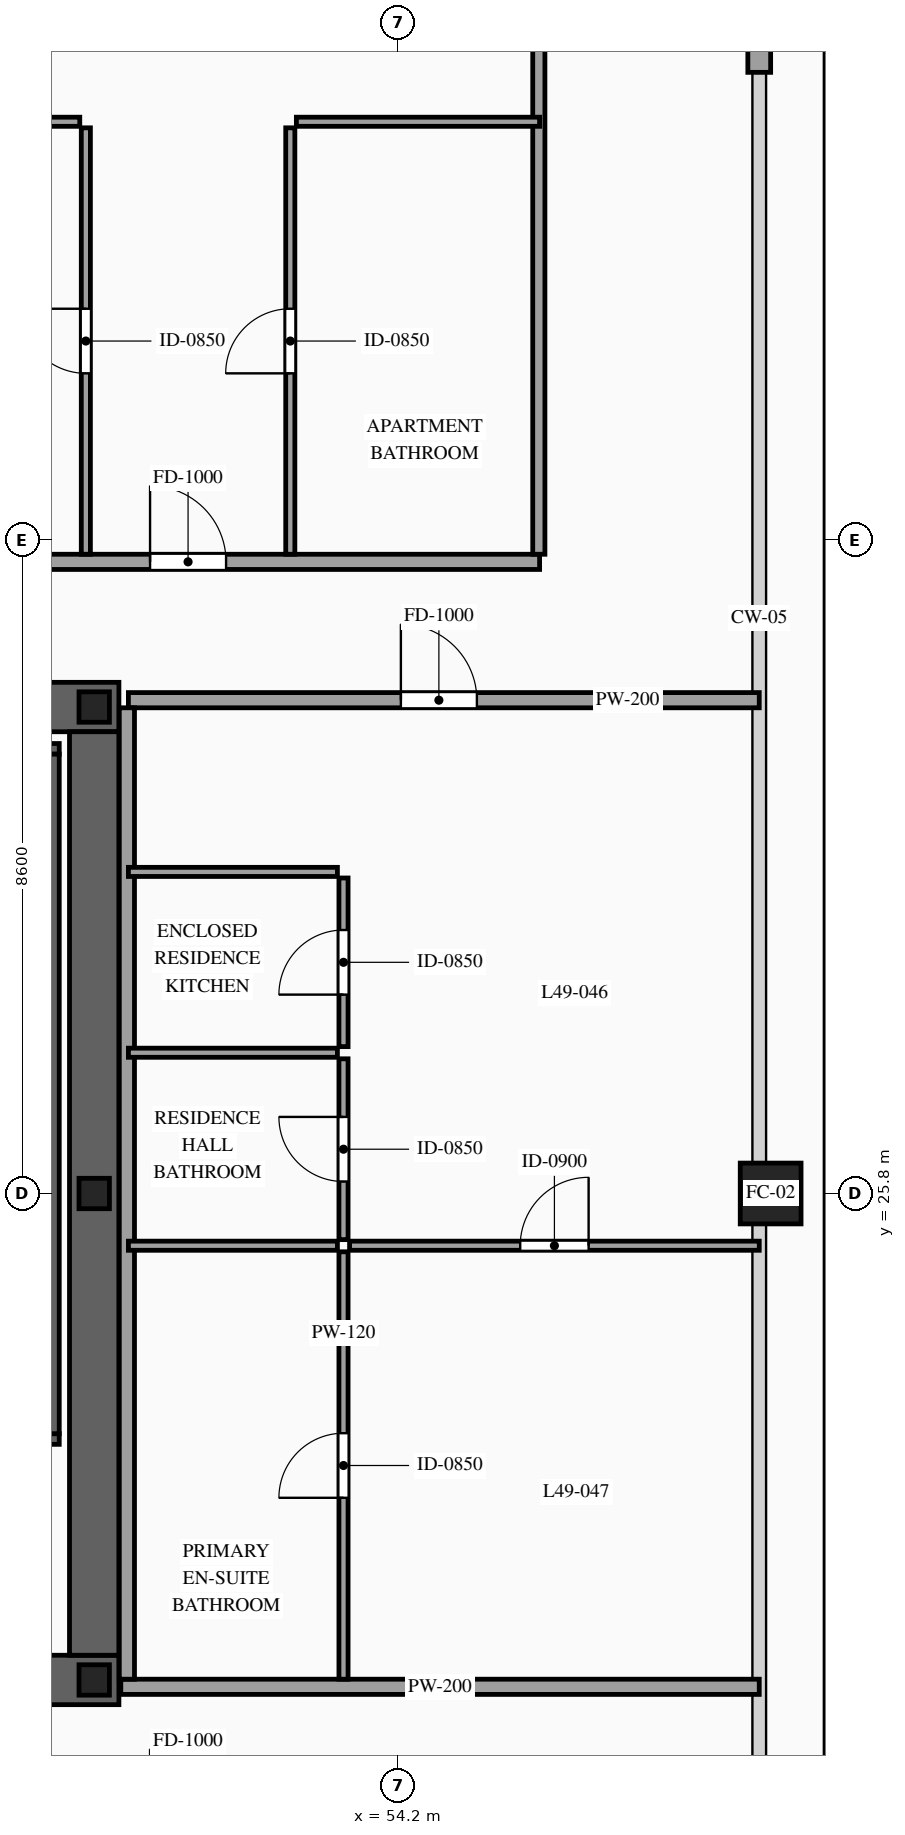
"""IFC4 building model, lengths in metres.
Left out: names, types, materials, properties, quantities, classifications, styles, units other than length and angle.
Written with IfcOpenShell. Run it as: python <this file> out.ifc"""

import sys

from ifc_helpers import new_model, si_unit, direction, frame, frame_2d, origin, origin_2d, place, context, subcontext, project, spatial, rectangle, hollow_rectangle, i_section, extrude, source, transform, mapped, element, fill, save


model = new_model("IFC4")
c1 = context("Model", 3, precision=1e-05, world=origin(), true_north=direction((0.0, 1.0)))
c2 = subcontext(c1, "Body", "Model", "MODEL_VIEW")
j1 = project(units=[si_unit("LENGTHUNIT", "METRE"), si_unit("PLANEANGLEUNIT", "RADIAN")], contexts=[c1])
p1 = place(None, origin())
s1 = spatial("IfcSite", under=j1, at=p1, CompositionType="ELEMENT")
p2 = place(p1, origin())
s2 = spatial("IfcBuilding", under=s1, at=p2, CompositionType="ELEMENT")
p3 = place(p2, frame((0.0, 0.0, 188.0)))
s3 = spatial("IfcBuildingStorey", under=s2, at=p3, CompositionType="ELEMENT", Elevation=188.0)
p4 = place(p3, frame((23.475, 19.4, 0.0), z_axis=(0.0, 0.0, 1.0), x_axis=(1.0, 0.0, 0.0)))
e1 = element("IfcWall", 1, at=p4, inside=s3, PredefinedType="SHEAR", context=c2, shape_type="SweptSolid", body=[
    extrude(rectangle(XDim=27.05, YDim=0.65, at=frame_2d((13.525, 0.0))), origin(), (0.0, 0.0, 1.0), 3.5),
])
p5 = place(p4, frame((1.975, 0.0, 0.0)))
e2 = element("IfcOpeningElement", 2, at=p5, cuts=e1, PredefinedType="OPENING", context=c2, shape_type="SweptSolid", body=[
    extrude(rectangle(XDim=1.1, YDim=2.2, at=frame_2d((0.55, 1.1))), frame((0.0, 0.34, 0.0), z_axis=(0.0, -1.0, 0.0), x_axis=(1.0, 0.0, 0.0)), (0.0, 0.0, 1.0), 0.68),
])
p6 = place(p4, frame((9.875, 0.0, 0.0)))
e3 = element("IfcOpeningElement", 3, at=p6, cuts=e1, PredefinedType="OPENING", context=c2, shape_type="SweptSolid", body=[
    extrude(rectangle(XDim=1.1, YDim=2.2, at=frame_2d((0.55, 1.1))), frame((0.0, 0.34, 0.0), z_axis=(0.0, -1.0, 0.0), x_axis=(1.0, 0.0, 0.0)), (0.0, 0.0, 1.0), 0.68),
])
p7 = place(p4, frame((23.075, 0.0, 0.0)))
e4 = element("IfcOpeningElement", 4, at=p7, cuts=e1, PredefinedType="OPENING", context=c2, shape_type="SweptSolid", body=[
    extrude(rectangle(XDim=1.1, YDim=2.2, at=frame_2d((0.55, 1.1))), frame((0.0, 0.34, 0.0), z_axis=(0.0, -1.0, 0.0), x_axis=(1.0, 0.0, 0.0)), (0.0, 0.0, 1.0), 0.68),
])
p8 = place(p4, frame((19.695, 0.0, 0.0)))
e5 = element("IfcOpeningElement", 5, at=p8, cuts=e1, PredefinedType="OPENING", context=c2, shape_type="SweptSolid", body=[
    extrude(rectangle(XDim=0.9, YDim=2.15, at=frame_2d((0.45, 1.075))), frame((0.0, 0.34, 0.0), z_axis=(0.0, -1.0, 0.0), x_axis=(1.0, 0.0, 0.0)), (0.0, 0.0, 1.0), 0.68),
])
p9 = place(p4, frame((18.255, 0.0, 0.0)))
e6 = element("IfcOpeningElement", 6, at=p9, cuts=e1, PredefinedType="OPENING", context=c2, shape_type="SweptSolid", body=[
    extrude(rectangle(XDim=0.9, YDim=2.15, at=frame_2d((0.45, 1.075))), frame((0.0, 0.34, 0.0), z_axis=(0.0, -1.0, 0.0), x_axis=(1.0, 0.0, 0.0)), (0.0, 0.0, 1.0), 0.68),
])
p10 = place(p3, frame((23.475, 32.2, 0.0), z_axis=(0.0, 0.0, 1.0), x_axis=(1.0, 0.0, 0.0)))
e7 = element("IfcWall", 7, at=p10, inside=s3, PredefinedType="SHEAR", context=c2, shape_type="SweptSolid", body=[
    extrude(rectangle(XDim=27.05, YDim=0.65, at=frame_2d((13.525, 0.0))), origin(), (0.0, 0.0, 1.0), 3.5),
])
p11 = place(p10, frame((4.595, 0.0, 0.0)))
e8 = element("IfcOpeningElement", 8, at=p11, cuts=e7, PredefinedType="OPENING", context=c2, shape_type="SweptSolid", body=[
    extrude(rectangle(XDim=0.9, YDim=2.15, at=frame_2d((0.45, 1.075))), frame((0.0, 0.34, 0.0), z_axis=(0.0, -1.0, 0.0), x_axis=(1.0, 0.0, 0.0)), (0.0, 0.0, 1.0), 0.68),
])
p12 = place(p10, frame((9.875, 0.0, 0.0)))
e9 = element("IfcOpeningElement", 9, at=p12, cuts=e7, PredefinedType="OPENING", context=c2, shape_type="SweptSolid", body=[
    extrude(rectangle(XDim=1.1, YDim=2.2, at=frame_2d((0.55, 1.1))), frame((0.0, 0.34, 0.0), z_axis=(0.0, -1.0, 0.0), x_axis=(1.0, 0.0, 0.0)), (0.0, 0.0, 1.0), 0.68),
])
p13 = place(p10, frame((15.725, 0.0, 0.0)))
e10 = element("IfcOpeningElement", 10, at=p13, cuts=e7, PredefinedType="OPENING", context=c2, shape_type="SweptSolid", body=[
    extrude(rectangle(XDim=1.1, YDim=2.2, at=frame_2d((0.55, 1.1))), frame((0.0, 0.34, 0.0), z_axis=(0.0, -1.0, 0.0), x_axis=(1.0, 0.0, 0.0)), (0.0, 0.0, 1.0), 0.68),
])
p14 = place(p10, frame((19.695, 0.0, 0.0)))
e11 = element("IfcOpeningElement", 11, at=p14, cuts=e7, PredefinedType="OPENING", context=c2, shape_type="SweptSolid", body=[
    extrude(rectangle(XDim=0.9, YDim=2.15, at=frame_2d((0.45, 1.075))), frame((0.0, 0.34, 0.0), z_axis=(0.0, -1.0, 0.0), x_axis=(1.0, 0.0, 0.0)), (0.0, 0.0, 1.0), 0.68),
])
m1 = source(origin(), c2, "Body", "SweptSolid", [
    extrude(rectangle(XDim=12.15, YDim=0.65, at=frame_2d((6.075, 0.0))), origin(), (0.0, 0.0, 1.0), 3.5),
])
p15 = place(p3, frame((50.2, 19.725, 0.0), z_axis=(0.0, 0.0, 1.0), x_axis=(0.0, 1.0, 0.0)))
e12 = element("IfcWall", 12, at=p15, inside=s3, PredefinedType="SHEAR", context=c2, shape_type="MappedRepresentation", body=[
    mapped(m1, transform((0.0, 0.0, 0.0), scale=1.0)),
])
m2 = source(origin(), c2, "Body", "SweptSolid", [
    extrude(i_section(OverallWidth=0.4, OverallDepth=0.4, WebThickness=0.013, FlangeThickness=0.021, at=origin_2d()), origin(), (0.0, 0.0, 1.0), 3.5),
])
for number, where, z_axis, x_axis in (
    (13, (50.2, 19.4, 0.0), (0.0, 0.0, 1.0), (1.0, 0.0, 0.0)),
    (14, (50.2, 25.8, 0.0), (0.0, 0.0, 1.0), (1.0, 0.0, 0.0)),
    (15, (50.2, 32.2, 0.0), (0.0, 0.0, 1.0), (1.0, 0.0, 0.0)),
):
    element("IfcColumn", number, at=place(p3, frame(where, z_axis=z_axis, x_axis=x_axis)), inside=s3, PredefinedType="COLUMN", context=c2, shape_type="MappedRepresentation", body=[
        mapped(m2, transform((0.0, 0.0, 0.0), scale=1.0)),
    ])
m3 = source(origin(), c2, "Body", "SweptSolid", [
    extrude(hollow_rectangle(XDim=0.8, YDim=0.8, WallThickness=0.036, at=origin_2d()), origin(), (0.0, 0.0, 1.0), 3.5),
])
p16 = place(p3, frame((59.1, 25.8, 0.0), z_axis=(0.0, 0.0, 1.0), x_axis=(1.0, 0.0, 0.0)))
e16 = element("IfcColumn", 16, at=p16, inside=s3, PredefinedType="COLUMN", context=c2, shape_type="MappedRepresentation", body=[
    mapped(m3, transform((0.0, 0.0, 0.0), scale=1.0)),
])
m4 = source(origin(), c2, "Body", "SweptSolid", [
    extrude(rectangle(XDim=3.05, YDim=0.3, at=frame_2d((1.525, 0.0))), origin(), (0.0, 0.0, 1.0), 2.835),
])
p17 = place(p3, frame((58.95, 40.55, 0.0), z_axis=(0.0, 0.0, 1.0), x_axis=(0.0, 1.0, 0.0)))
e17 = element("IfcWall", 17, at=p17, inside=s3, PredefinedType="SOLIDWALL", context=c2, shape_type="MappedRepresentation", body=[
    mapped(m4, transform((0.0, 0.0, 0.0), scale=1.0)),
])
p18 = place(p3, frame((46.46, 22.57, 0.0), z_axis=(0.0, 0.0, 1.0), x_axis=(1.0, 0.0, 0.0)))
e18 = element("IfcWall", 18, at=p18, inside=s3, PredefinedType="SOLIDWALL", context=c2, shape_type="SweptSolid", body=[
    extrude(rectangle(XDim=3.28, YDim=0.14, at=frame_2d((1.64, 0.0))), origin(), (0.0, 0.0, 1.0), 3.28),
])
p19 = place(p18, frame((1.09, 0.0, 0.0)))
e19 = element("IfcOpeningElement", 19, at=p19, cuts=e18, PredefinedType="OPENING", context=c2, shape_type="SweptSolid", body=[
    extrude(rectangle(XDim=1.1, YDim=2.2, at=frame_2d((0.55, 1.1))), frame((0.0, 0.085, 0.0), z_axis=(0.0, -1.0, 0.0), x_axis=(1.0, 0.0, 0.0)), (0.0, 0.0, 1.0), 0.17),
])
m5 = source(origin(), c2, "Body", "SweptSolid", [
    extrude(rectangle(XDim=3.28, YDim=0.14, at=frame_2d((1.64, 0.0))), origin(), (0.0, 0.0, 1.0), 3.28),
])
p20 = place(p3, frame((46.46, 31.65, 0.0), z_axis=(0.0, 0.0, 1.0), x_axis=(1.0, 0.0, 0.0)))
e20 = element("IfcWall", 20, at=p20, inside=s3, PredefinedType="SOLIDWALL", context=c2, shape_type="MappedRepresentation", body=[
    mapped(m5, transform((0.0, 0.0, 0.0), scale=1.0)),
])
m6 = source(origin(), c2, "Body", "SweptSolid", [
    extrude(rectangle(XDim=8.94, YDim=0.14, at=frame_2d((4.47, 0.0))), origin(), (0.0, 0.0, 1.0), 3.28),
])
p21 = place(p3, frame((49.67, 22.64, 0.0), z_axis=(0.0, 0.0, 1.0), x_axis=(0.0, 1.0, 0.0)))
e21 = element("IfcWall", 21, at=p21, inside=s3, PredefinedType="SOLIDWALL", context=c2, shape_type="MappedRepresentation", body=[
    mapped(m6, transform((0.0, 0.0, 0.0), scale=1.0)),
])
p22 = place(p3, frame((46.61, 34.11, 0.0), z_axis=(0.0, 0.0, 1.0), x_axis=(1.0, 0.0, 0.0)))
e22 = element("IfcWall", 22, at=p22, inside=s3, PredefinedType="PARTITIONING", context=c2, shape_type="SweptSolid", body=[
    extrude(rectangle(XDim=9.45, YDim=0.2, at=frame_2d((4.725, 0.0))), origin(), (0.0, 0.0, 1.0), 3.28),
])
p23 = place(p22, frame((4.325, 0.0, 0.0)))
e23 = element("IfcOpeningElement", 23, at=p23, cuts=e22, PredefinedType="OPENING", context=c2, shape_type="SweptSolid", body=[
    extrude(rectangle(XDim=1.0, YDim=2.2, at=frame_2d((0.5, 1.1))), frame((0.0, 0.115, 0.0), z_axis=(0.0, -1.0, 0.0), x_axis=(1.0, 0.0, 0.0)), (0.0, 0.0, 1.0), 0.23),
])
m7 = source(origin(), c2, "Body", "SweptSolid", [
    extrude(rectangle(XDim=13.39, YDim=0.16, at=frame_2d((6.695, 0.0))), origin(), (0.0, 0.0, 1.0), 3.28),
])
p24 = place(p3, frame((56.05, 34.21, 0.0), z_axis=(0.0, 0.0, 1.0), x_axis=(0.0, 1.0, 0.0)))
e24 = element("IfcWall", 24, at=p24, inside=s3, PredefinedType="PARTITIONING", context=c2, shape_type="MappedRepresentation", body=[
    mapped(m7, transform((0.0, 0.0, 0.0), scale=1.0)),
])
m8 = source(origin(), c2, "Body", "SweptSolid", [
    extrude(rectangle(XDim=3.4, YDim=0.12, at=frame_2d((1.7, 0.0))), origin(), (0.0, 0.0, 1.0), 2.875),
])
p25 = place(p3, frame((46.61, 39.9, 0.0), z_axis=(0.0, 0.0, 1.0), x_axis=(1.0, 0.0, 0.0)))
e25 = element("IfcWall", 25, at=p25, inside=s3, PredefinedType="PARTITIONING", context=c2, shape_type="MappedRepresentation", body=[
    mapped(m8, transform((0.0, 0.0, 0.0), scale=1.0)),
])
p26 = place(p3, frame((50.09, 34.21, 0.0), z_axis=(0.0, 0.0, 1.0), x_axis=(0.0, 1.0, 0.0)))
e26 = element("IfcWall", 26, at=p26, inside=s3, PredefinedType="PARTITIONING", context=c2, shape_type="SweptSolid", body=[
    extrude(rectangle(XDim=5.61, YDim=0.12, at=frame_2d((2.805, 0.0))), origin(), (0.0, 0.0, 1.0), 2.775),
])
p27 = place(p26, frame((2.38, 0.0, 0.0)))
e27 = element("IfcOpeningElement", 27, at=p27, cuts=e26, PredefinedType="OPENING", context=c2, shape_type="SweptSolid", body=[
    extrude(rectangle(XDim=0.85, YDim=2.1, at=frame_2d((0.425, 1.05))), frame((0.0, 0.075, 0.0), z_axis=(0.0, -1.0, 0.0), x_axis=(1.0, 0.0, 0.0)), (0.0, 0.0, 1.0), 0.15),
])
m9 = source(origin(), c2, "Body", "SweptSolid", [
    extrude(rectangle(XDim=3.2, YDim=0.12, at=frame_2d((1.6, 0.0))), origin(), (0.0, 0.0, 1.0), 3.28),
])
p28 = place(p3, frame((52.86, 39.9, 0.0), z_axis=(0.0, 0.0, 1.0), x_axis=(1.0, 0.0, 0.0)))
e28 = element("IfcWall", 28, at=p28, inside=s3, PredefinedType="PARTITIONING", context=c2, shape_type="MappedRepresentation", body=[
    mapped(m9, transform((0.0, 0.0, 0.0), scale=1.0)),
])
p29 = place(p3, frame((52.78, 34.21, 0.0), z_axis=(0.0, 0.0, 1.0), x_axis=(0.0, 1.0, 0.0)))
e29 = element("IfcWall", 29, at=p29, inside=s3, PredefinedType="PARTITIONING", context=c2, shape_type="SweptSolid", body=[
    extrude(rectangle(XDim=5.61, YDim=0.12, at=frame_2d((2.805, 0.0))), origin(), (0.0, 0.0, 1.0), 3.28),
])
p30 = place(p29, frame((2.38, 0.0, 0.0)))
e30 = element("IfcOpeningElement", 30, at=p30, cuts=e29, PredefinedType="OPENING", context=c2, shape_type="SweptSolid", body=[
    extrude(rectangle(XDim=0.85, YDim=2.1, at=frame_2d((0.425, 1.05))), frame((0.0, 0.075, 0.0), z_axis=(0.0, -1.0, 0.0), x_axis=(1.0, 0.0, 0.0)), (0.0, 0.0, 1.0), 0.15),
])
p31 = place(p3, frame((50.65, 32.29, 0.0), z_axis=(0.0, 0.0, 1.0), x_axis=(1.0, 0.0, 0.0)))
e31 = element("IfcWall", 31, at=p31, inside=s3, PredefinedType="PARTITIONING", context=c2, shape_type="SweptSolid", body=[
    extrude(rectangle(XDim=8.3, YDim=0.2, at=frame_2d((4.15, 0.0))), origin(), (0.0, 0.0, 1.0), 2.775),
])
p32 = place(p31, frame((3.585, 0.0, 0.0)))
e32 = element("IfcOpeningElement", 32, at=p32, cuts=e31, PredefinedType="OPENING", context=c2, shape_type="SweptSolid", body=[
    extrude(rectangle(XDim=1.0, YDim=2.2, at=frame_2d((0.5, 1.1))), frame((0.0, 0.115, 0.0), z_axis=(0.0, -1.0, 0.0), x_axis=(1.0, 0.0, 0.0)), (0.0, 0.0, 1.0), 0.23),
])
m10 = source(origin(), c2, "Body", "SweptSolid", [
    extrude(rectangle(XDim=8.4, YDim=0.2, at=frame_2d((4.2, 0.0))), origin(), (0.0, 0.0, 1.0), 2.775),
])
p33 = place(p3, frame((50.55, 19.31, 0.0), z_axis=(0.0, 0.0, 1.0), x_axis=(1.0, 0.0, 0.0)))
e33 = element("IfcWall", 33, at=p33, inside=s3, PredefinedType="PARTITIONING", context=c2, shape_type="MappedRepresentation", body=[
    mapped(m10, transform((0.0, 0.0, 0.0), scale=1.0)),
])
m11 = source(origin(), c2, "Body", "SweptSolid", [
    extrude(rectangle(XDim=12.78, YDim=0.2, at=frame_2d((6.39, 0.0))), origin(), (0.0, 0.0, 1.0), 3.28),
])
p34 = place(p3, frame((50.63, 19.41, 0.0), z_axis=(0.0, 0.0, 1.0), x_axis=(0.0, 1.0, 0.0)))
e34 = element("IfcWall", 34, at=p34, inside=s3, PredefinedType="PARTITIONING", context=c2, shape_type="MappedRepresentation", body=[
    mapped(m11, transform((0.0, 0.0, 0.0), scale=1.0)),
])
m12 = source(origin(), c2, "Body", "SweptSolid", [
    extrude(rectangle(XDim=2.75, YDim=0.12, at=frame_2d((1.375, 0.0))), origin(), (0.0, 0.0, 1.0), 3.28),
])
for number, where, z_axis, x_axis in (
    (35, (50.65, 25.113, 0.0), (0.0, 0.0, 1.0), (1.0, 0.0, 0.0)),
    (36, (50.65, 27.652, 0.0), (0.0, 0.0, 1.0), (1.0, 0.0, 0.0)),
):
    element("IfcWall", number, at=place(p3, frame(where, z_axis=z_axis, x_axis=x_axis)), inside=s3, PredefinedType="PARTITIONING", context=c2, shape_type="MappedRepresentation", body=[
        mapped(m12, transform((0.0, 0.0, 0.0), scale=1.0)),
    ])
p35 = place(p3, frame((53.48, 25.193, 0.0), z_axis=(0.0, 0.0, 1.0), x_axis=(0.0, 1.0, 0.0)))
e37 = element("IfcWall", 37, at=p35, inside=s3, PredefinedType="PARTITIONING", context=c2, shape_type="SweptSolid", body=[
    extrude(rectangle(XDim=2.379, YDim=0.12, at=frame_2d((1.189, 0.0))), origin(), (0.0, 0.0, 1.0), 3.28),
])
p36 = place(p35, frame((0.764, 0.0, 0.0)))
e38 = element("IfcOpeningElement", 38, at=p36, cuts=e37, PredefinedType="OPENING", context=c2, shape_type="SweptSolid", body=[
    extrude(rectangle(XDim=0.85, YDim=2.1, at=frame_2d((0.425, 1.05))), frame((0.0, 0.075, 0.0), z_axis=(0.0, -1.0, 0.0), x_axis=(1.0, 0.0, 0.0)), (0.0, 0.0, 1.0), 0.15),
])
p37 = place(p3, frame((50.65, 30.031, 0.0), z_axis=(0.0, 0.0, 1.0), x_axis=(1.0, 0.0, 0.0)))
e39 = element("IfcWall", 39, at=p37, inside=s3, PredefinedType="PARTITIONING", context=c2, shape_type="MappedRepresentation", body=[
    mapped(m12, transform((0.0, 0.0, 0.0), scale=1.0)),
])
p38 = place(p3, frame((53.48, 27.732, 0.0), z_axis=(0.0, 0.0, 1.0), x_axis=(0.0, 1.0, 0.0)))
e40 = element("IfcWall", 40, at=p38, inside=s3, PredefinedType="PARTITIONING", context=c2, shape_type="SweptSolid", body=[
    extrude(rectangle(XDim=2.219, YDim=0.12, at=frame_2d((1.109, 0.0))), origin(), (0.0, 0.0, 1.0), 3.28),
])
p39 = place(p38, frame((0.685, 0.0, 0.0)))
e41 = element("IfcOpeningElement", 41, at=p39, cuts=e40, PredefinedType="OPENING", context=c2, shape_type="SweptSolid", body=[
    extrude(rectangle(XDim=0.85, YDim=2.1, at=frame_2d((0.425, 1.05))), frame((0.0, 0.075, 0.0), z_axis=(0.0, -1.0, 0.0), x_axis=(1.0, 0.0, 0.0)), (0.0, 0.0, 1.0), 0.15),
])
p40 = place(p3, frame((53.56, 25.113, 0.0), z_axis=(0.0, 0.0, 1.0), x_axis=(1.0, 0.0, 0.0)))
e42 = element("IfcWall", 42, at=p40, inside=s3, PredefinedType="PARTITIONING", context=c2, shape_type="SweptSolid", body=[
    extrude(rectangle(XDim=5.39, YDim=0.12, at=frame_2d((2.695, 0.0))), origin(), (0.0, 0.0, 1.0), 3.28),
])
p41 = place(p40, frame((2.245, 0.0, 0.0)))
e43 = element("IfcOpeningElement", 43, at=p41, cuts=e42, PredefinedType="OPENING", context=c2, shape_type="SweptSolid", body=[
    extrude(rectangle(XDim=0.9, YDim=2.15, at=frame_2d((0.45, 1.075))), frame((0.0, 0.075, 0.0), z_axis=(0.0, -1.0, 0.0), x_axis=(1.0, 0.0, 0.0)), (0.0, 0.0, 1.0), 0.15),
])
p42 = place(p3, frame((53.48, 19.41, 0.0), z_axis=(0.0, 0.0, 1.0), x_axis=(0.0, 1.0, 0.0)))
e44 = element("IfcWall", 44, at=p42, inside=s3, PredefinedType="PARTITIONING", context=c2, shape_type="SweptSolid", body=[
    extrude(rectangle(XDim=5.623, YDim=0.12, at=frame_2d((2.812, 0.0))), origin(), (0.0, 0.0, 1.0), 3.28),
])
p43 = place(p42, frame((2.386, 0.0, 0.0)))
e45 = element("IfcOpeningElement", 45, at=p43, cuts=e44, PredefinedType="OPENING", context=c2, shape_type="SweptSolid", body=[
    extrude(rectangle(XDim=0.85, YDim=2.1, at=frame_2d((0.425, 1.05))), frame((0.0, 0.075, 0.0), z_axis=(0.0, -1.0, 0.0), x_axis=(1.0, 0.0, 0.0)), (0.0, 0.0, 1.0), 0.15),
])
m13 = source(origin(), c2, "Body", "SweptSolid", [
    extrude(rectangle(XDim=1.0, YDim=2.2, at=frame_2d((0.5, 1.1))), frame((0.0, 0.025, 0.0), z_axis=(0.0, -1.0, 0.0), x_axis=(1.0, 0.0, 0.0)), (0.0, 0.0, 1.0), 0.05),
])
p44 = place(p23, origin())
e46 = element("IfcDoor", 46, at=p44, inside=s3, OperationType="SINGLE_SWING_LEFT", PredefinedType="DOOR", context=c2, shape_type="MappedRepresentation", body=[
    mapped(m13, transform((0.0, 0.0, 0.0), scale=1.0)),
])
fill(e23, e46)
m14 = source(origin(), c2, "Body", "SweptSolid", [
    extrude(rectangle(XDim=0.85, YDim=2.1, at=frame_2d((0.425, 1.05))), frame((0.0, 0.025, 0.0), z_axis=(0.0, -1.0, 0.0), x_axis=(1.0, 0.0, 0.0)), (0.0, 0.0, 1.0), 0.05),
])
p45 = place(p27, origin())
e47 = element("IfcDoor", 47, at=p45, inside=s3, OperationType="SINGLE_SWING_RIGHT", PredefinedType="DOOR", context=c2, shape_type="MappedRepresentation", body=[
    mapped(m14, transform((0.0, 0.0, 0.0), scale=1.0)),
])
fill(e27, e47)
p46 = place(p30, origin())
e48 = element("IfcDoor", 48, at=p46, inside=s3, OperationType="SINGLE_SWING_LEFT", PredefinedType="DOOR", context=c2, shape_type="MappedRepresentation", body=[
    mapped(m14, transform((0.0, 0.0, 0.0), scale=1.0)),
])
fill(e30, e48)
p47 = place(p32, origin())
e49 = element("IfcDoor", 49, at=p47, inside=s3, OperationType="SINGLE_SWING_LEFT", PredefinedType="DOOR", context=c2, shape_type="MappedRepresentation", body=[
    mapped(m13, transform((0.0, 0.0, 0.0), scale=1.0)),
])
fill(e32, e49)
p48 = place(p36, origin())
e50 = element("IfcDoor", 50, at=p48, inside=s3, OperationType="SINGLE_SWING_RIGHT", PredefinedType="DOOR", context=c2, shape_type="MappedRepresentation", body=[
    mapped(m14, transform((0.0, 0.0, 0.0), scale=1.0)),
])
fill(e38, e50)
p49 = place(p39, origin())
e51 = element("IfcDoor", 51, at=p49, inside=s3, OperationType="SINGLE_SWING_LEFT", PredefinedType="DOOR", context=c2, shape_type="MappedRepresentation", body=[
    mapped(m14, transform((0.0, 0.0, 0.0), scale=1.0)),
])
fill(e41, e51)
m15 = source(origin(), c2, "Body", "SweptSolid", [
    extrude(rectangle(XDim=0.9, YDim=2.15, at=frame_2d((0.45, 1.075))), frame((0.0, 0.025, 0.0), z_axis=(0.0, -1.0, 0.0), x_axis=(1.0, 0.0, 0.0)), (0.0, 0.0, 1.0), 0.05),
])
p50 = place(p41, origin())
e52 = element("IfcDoor", 52, at=p50, inside=s3, OperationType="SINGLE_SWING_RIGHT", PredefinedType="DOOR", context=c2, shape_type="MappedRepresentation", body=[
    mapped(m15, transform((0.0, 0.0, 0.0), scale=1.0)),
])
fill(e43, e52)
p51 = place(p43, origin())
e53 = element("IfcDoor", 53, at=p51, inside=s3, OperationType="SINGLE_SWING_LEFT", PredefinedType="DOOR", context=c2, shape_type="MappedRepresentation", body=[
    mapped(m14, transform((0.0, 0.0, 0.0), scale=1.0)),
])
fill(e45, e53)
save(model, sys.argv[1])
